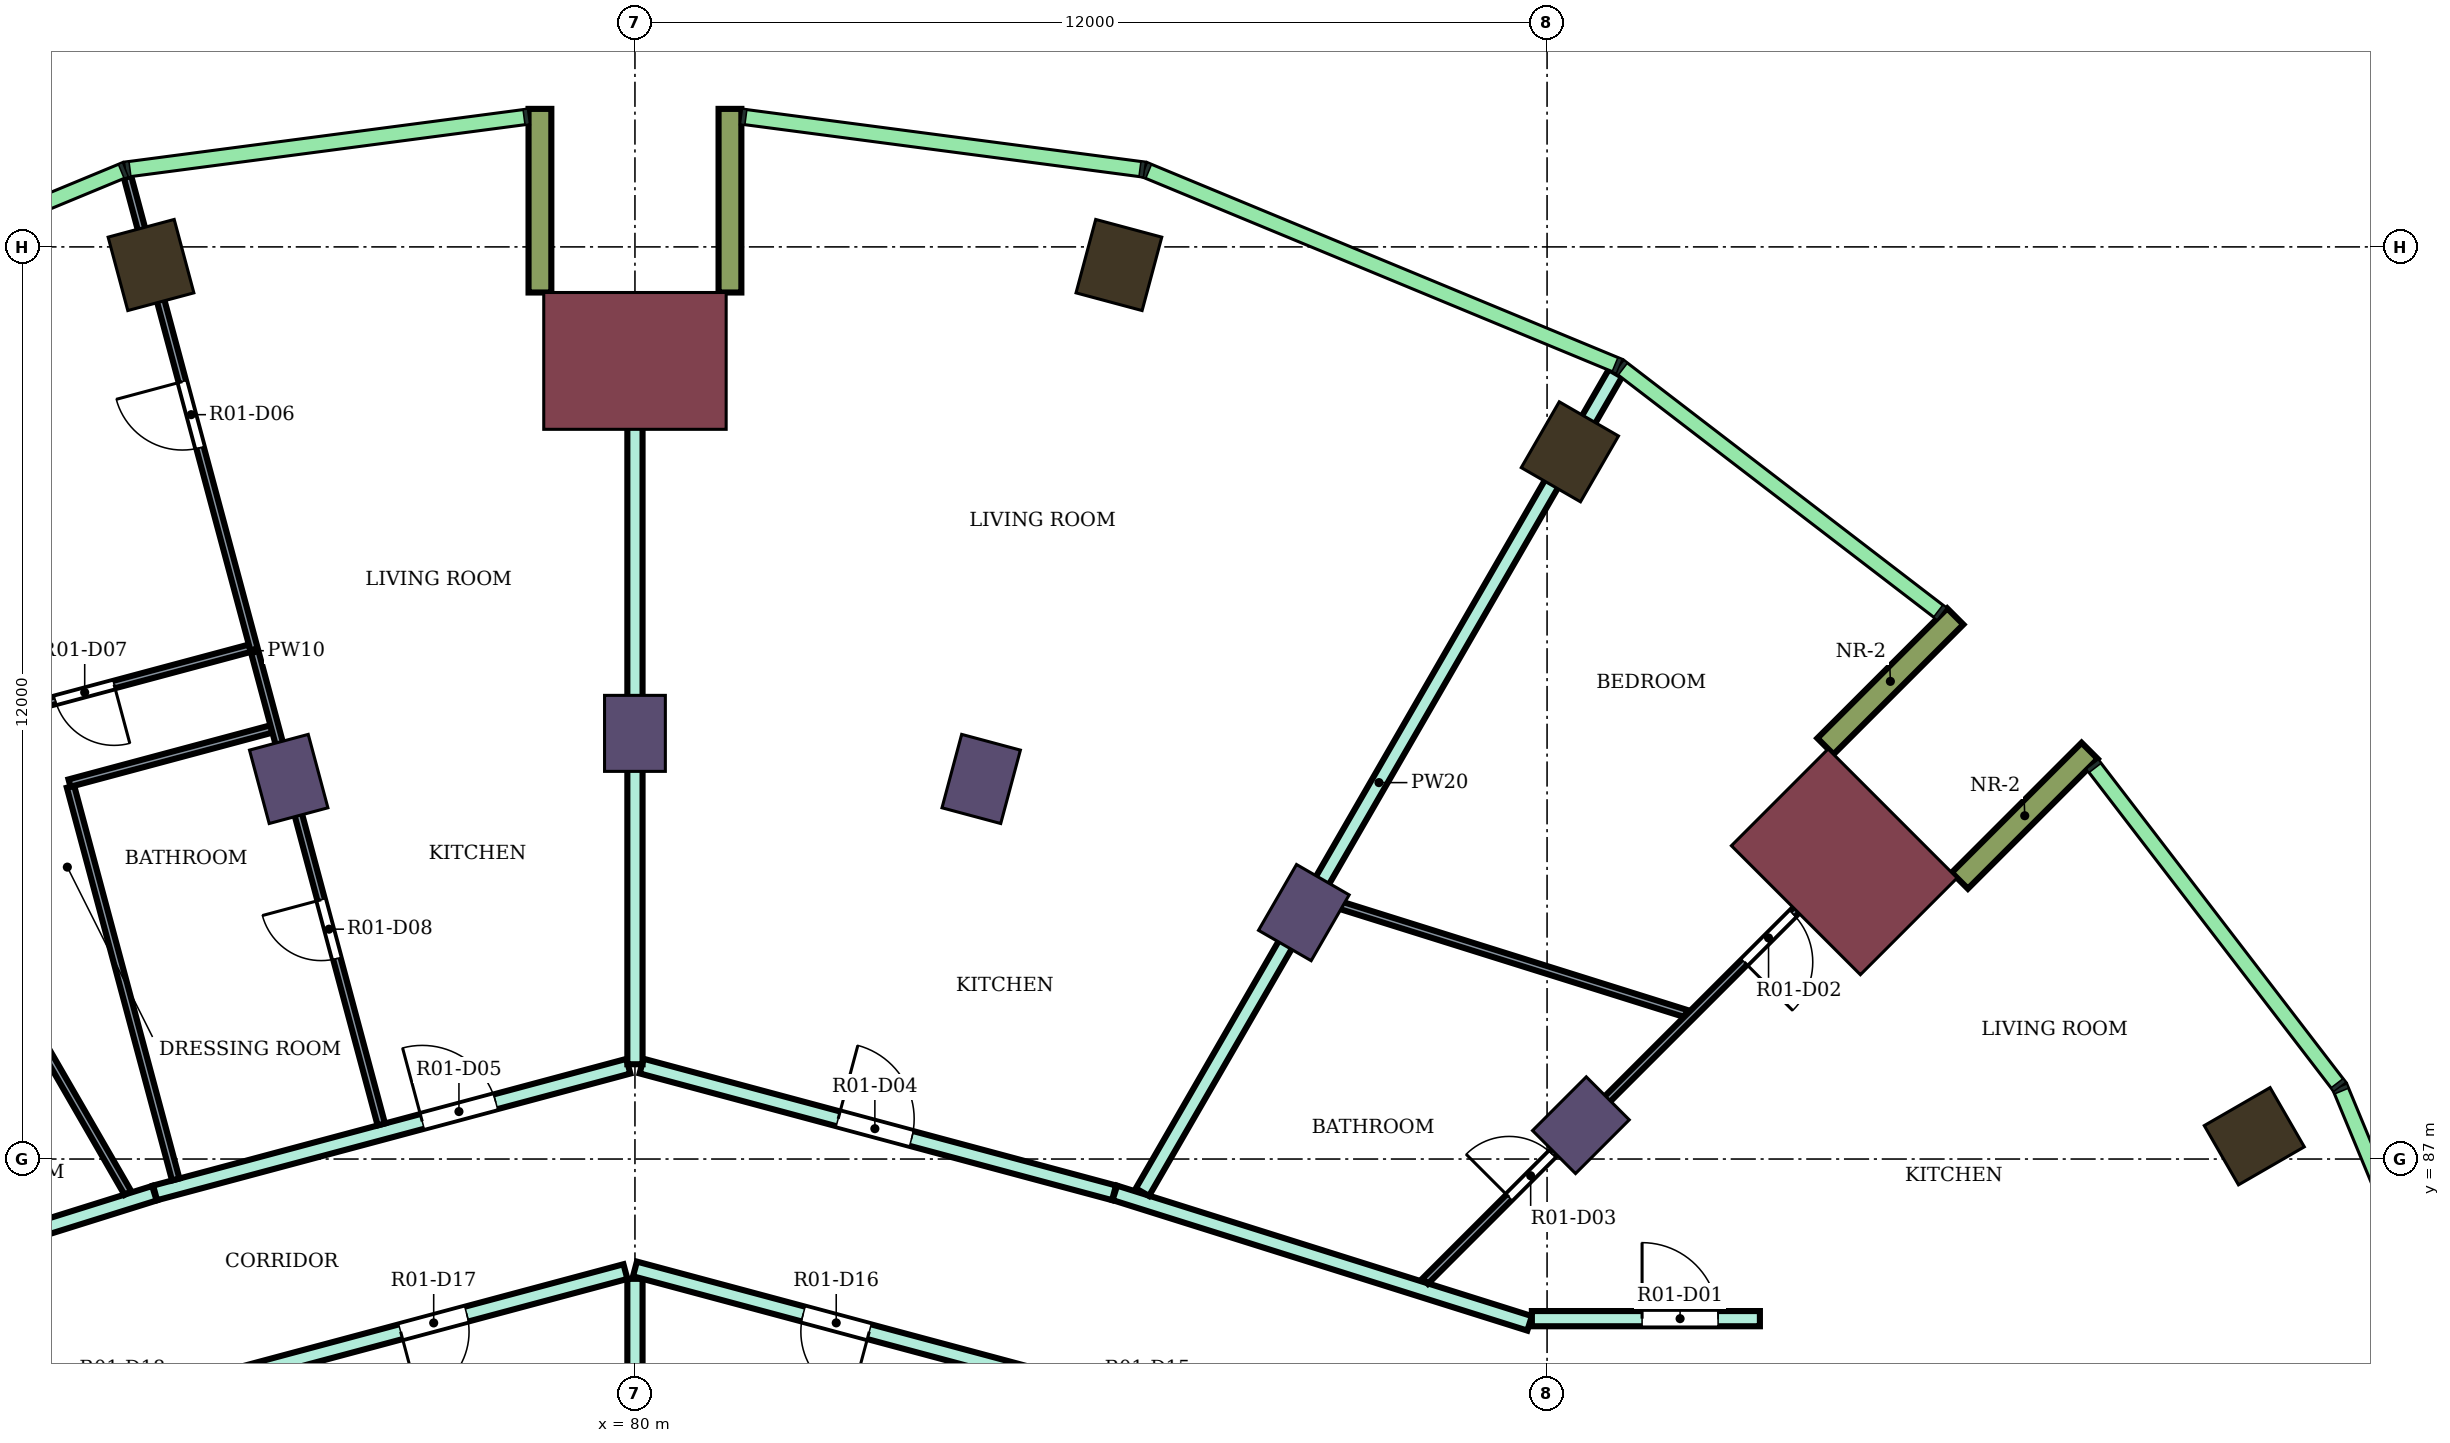
"""IFC4 building model, lengths in metres.
Left out: names, types, materials, properties, quantities, classifications, styles, units other than length and angle.
Written with IfcOpenShell. Run it as: python <this file> out.ifc"""

import sys

from ifc_helpers import new_model, si_unit, direction, frame, frame_2d, origin, origin_2d, place, context, subcontext, project, spatial, rectangle, extrude, element, fill, save


model = new_model("IFC4")
c1 = context("Model", 3, precision=1e-05, world=origin(), true_north=direction((0.0, 1.0)))
c2 = subcontext(c1, "Body", "Model", "MODEL_VIEW")
j1 = project(units=[si_unit("LENGTHUNIT", "METRE"), si_unit("PLANEANGLEUNIT", "RADIAN")], contexts=[c1])
p1 = place(None, origin())
s1 = spatial("IfcSite", under=j1, at=p1, CompositionType="ELEMENT")
p2 = place(p1, origin())
s2 = spatial("IfcBuilding", under=s1, at=p2, CompositionType="ELEMENT")
p3 = place(p2, frame((0.0, 0.0, 165.9)))
s3 = spatial("IfcBuildingStorey", under=s2, at=p3, CompositionType="ELEMENT", Elevation=165.9)
for number, where, z_axis, x_axis in (
    (1, (101.304, 87.3, 0.0), (0.0, 0.0, 1.0), (0.866, 0.5, 0.0)),
    (2, (92.3, 96.304, 0.0), (0.0, 0.0, 1.0), (0.5, 0.866, 0.0)),
    (3, (86.367, 98.762, 0.0), (0.0, 0.0, 1.0), (0.259, 0.966, 0.0)),
    (4, (73.633, 98.762, 0.0), (0.0, 0.0, 1.0), (-0.259, 0.966, 0.0)),
):
    element("IfcColumn", number, at=place(p3, frame(where, z_axis=z_axis, x_axis=x_axis)), inside=s3, PredefinedType="COLUMN", context=c2, shape_type="SweptSolid", body=[
        extrude(rectangle(XDim=1.0, YDim=0.9, at=origin_2d()), origin(), (0.0, 0.0, 1.0), 4.1),
    ])
for number, where, z_axis, x_axis in (
    (5, (92.445, 87.445, 0.0), (0.0, 0.0, 1.0), (0.707, 0.707, 0.0)),
    (6, (88.8, 90.242, 0.0), (0.0, 0.0, 1.0), (0.5, 0.866, 0.0)),
    (7, (84.555, 92.0, 0.0), (0.0, 0.0, 1.0), (0.259, 0.966, 0.0)),
    (8, (80.0, 92.6, 0.0), (0.0, 0.0, 1.0), (0.0, 1.0, 0.0)),
    (9, (75.445, 92.0, 0.0), (0.0, 0.0, 1.0), (-0.259, 0.966, 0.0)),
):
    element("IfcColumn", number, at=place(p3, frame(where, z_axis=z_axis, x_axis=x_axis)), inside=s3, PredefinedType="COLUMN", context=c2, shape_type="SweptSolid", body=[
        extrude(rectangle(XDim=1.0, YDim=0.8, at=origin_2d()), origin(), (0.0, 0.0, 1.0), 4.1),
    ])
for number, where, z_axis, x_axis in (
    (10, (95.91, 90.91, 0.0), (0.0, 0.0, 1.0), (0.707, 0.707, 0.0)),
    (11, (80.0, 97.5, 0.0), (0.0, 0.0, 1.0), (0.0, 1.0, 0.0)),
):
    element("IfcColumn", number, at=place(p3, frame(where, z_axis=z_axis, x_axis=x_axis)), inside=s3, PredefinedType="COLUMN", context=c2, shape_type="SweptSolid", body=[
        extrude(rectangle(XDim=1.8, YDim=2.4, at=origin_2d()), origin(), (0.0, 0.0, 1.0), 4.1),
    ])
for number, where, z_axis, x_axis in (
    (12, (97.43, 90.662, 0.0), (0.0, 0.0, 1.0), (0.707, 0.707, 0.0)),
    (13, (95.662, 92.43, 0.0), (0.0, 0.0, 1.0), (0.707, 0.707, 0.0)),
    (14, (81.25, 98.4, 0.0), (0.0, 0.0, 1.0), (0.0, 1.0, 0.0)),
    (15, (78.75, 98.4, 0.0), (0.0, 0.0, 1.0), (0.0, 1.0, 0.0)),
):
    element("IfcWall", number, at=place(p3, frame(where, z_axis=z_axis, x_axis=x_axis)), inside=s3, PredefinedType="NOTDEFINED", context=c2, shape_type="SweptSolid", body=[
        extrude(rectangle(XDim=2.416, YDim=0.3, at=frame_2d((1.208, 0.0))), origin(), (0.0, 0.0, 1.0), 4.1),
    ])
p4 = place(p3, frame((68.2, 84.834, 0.0), z_axis=(0.0, 0.0, 1.0), x_axis=(0.954272398161, 0.298938438661, 0.0)))
e16 = element("IfcWall", 16, at=p4, inside=s3, PredefinedType="PARTITIONING", context=c2, shape_type="SweptSolid", body=[
    extrude(rectangle(XDim=5.74, YDim=0.2, at=frame_2d((2.87, 0.0))), origin(), (0.0, 0.0, 1.0), 3.65),
])
p5 = place(p3, frame((73.687, 86.554, 0.0), z_axis=(0.0, 0.0, 1.0), x_axis=(0.965999420828, 0.258544230182, 0.0)))
e17 = element("IfcWall", 17, at=p5, inside=s3, PredefinedType="PARTITIONING", context=c2, shape_type="SweptSolid", body=[
    extrude(rectangle(XDim=6.446, YDim=0.2, at=frame_2d((3.223, 0.0))), origin(), (0.0, 0.0, 1.0), 3.65),
])
p6 = place(p5, frame((3.638, 0.0, 0.0)))
e18 = element("IfcOpeningElement", 18, at=p6, cuts=e17, PredefinedType="OPENING", context=c2, shape_type="SweptSolid", body=[
    extrude(rectangle(XDim=1.0, YDim=2.1, at=frame_2d((0.5, 1.05))), frame((0.0, 0.11, 0.0), z_axis=(0.0, -1.0, 0.0), x_axis=(1.0, 0.0, 0.0)), (0.0, 0.0, 1.0), 0.22),
])
p7 = place(p3, frame((74.413, 84.057, 0.0), z_axis=(0.0, 0.0, 1.0), x_axis=(0.965972135939, 0.258646153246, 0.0)))
e19 = element("IfcWall", 19, at=p7, inside=s3, PredefinedType="PARTITIONING", context=c2, shape_type="SweptSolid", body=[
    extrude(rectangle(XDim=5.654, YDim=0.2, at=frame_2d((2.827, 0.0))), origin(), (0.0, 0.0, 1.0), 3.65),
])
p8 = place(p7, frame((2.593, 0.0, 0.0)))
e20 = element("IfcOpeningElement", 20, at=p8, cuts=e19, PredefinedType="OPENING", context=c2, shape_type="SweptSolid", body=[
    extrude(rectangle(XDim=0.9, YDim=2.1, at=frame_2d((0.45, 1.05))), frame((0.0, 0.11, 0.0), z_axis=(0.0, -1.0, 0.0), x_axis=(1.0, 0.0, 0.0)), (0.0, 0.0, 1.0), 0.22),
])
p9 = place(p3, frame((80.0, 82.699, 0.0), z_axis=(0.0, 0.0, 1.0), x_axis=(0.0, 1.0, 0.0)))
e21 = element("IfcWall", 21, at=p9, inside=s3, PredefinedType="PARTITIONING", context=c2, shape_type="SweptSolid", body=[
    extrude(rectangle(XDim=2.725, YDim=0.2, at=frame_2d((1.363, 0.0))), origin(), (0.0, 0.0, 1.0), 3.65),
])
p10 = place(p3, frame((80.0, 85.554, 0.0), z_axis=(0.0, 0.0, 1.0), x_axis=(0.965928989968, -0.258807237802, 0.0)))
e22 = element("IfcWall", 22, at=p10, inside=s3, PredefinedType="PARTITIONING", context=c2, shape_type="SweptSolid", body=[
    extrude(rectangle(XDim=5.774, YDim=0.2, at=frame_2d((2.887, 0.0))), origin(), (0.0, 0.0, 1.0), 3.65),
])
p11 = place(p10, frame((2.292, 0.0, 0.0)))
e23 = element("IfcOpeningElement", 23, at=p11, cuts=e22, PredefinedType="OPENING", context=c2, shape_type="SweptSolid", body=[
    extrude(rectangle(XDim=0.9, YDim=2.1, at=frame_2d((0.45, 1.05))), frame((0.0, 0.11, 0.0), z_axis=(0.0, -1.0, 0.0), x_axis=(1.0, 0.0, 0.0)), (0.0, 0.0, 1.0), 0.22),
])
p12 = place(p3, frame((80.087, 88.223, 0.0), z_axis=(0.0, 0.0, 1.0), x_axis=(0.965852330757, -0.25909317855, 0.0)))
e24 = element("IfcWall", 24, at=p12, inside=s3, PredefinedType="PARTITIONING", context=c2, shape_type="SweptSolid", body=[
    extrude(rectangle(XDim=6.436, YDim=0.2, at=frame_2d((3.218, 0.0))), origin(), (0.0, 0.0, 1.0), 3.65),
])
p13 = place(p12, frame((2.678, 0.0, 0.0)))
e25 = element("IfcOpeningElement", 25, at=p13, cuts=e24, PredefinedType="OPENING", context=c2, shape_type="SweptSolid", body=[
    extrude(rectangle(XDim=1.0, YDim=2.1, at=frame_2d((0.5, 1.05))), frame((0.0, 0.11, 0.0), z_axis=(0.0, -1.0, 0.0), x_axis=(1.0, 0.0, 0.0)), (0.0, 0.0, 1.0), 0.22),
])
p14 = place(p3, frame((80.0, 88.247, 0.0), z_axis=(0.0, 0.0, 1.0), x_axis=(0.0, 1.0, 0.0)))
e26 = element("IfcWall", 26, at=p14, inside=s3, PredefinedType="PARTITIONING", context=c2, shape_type="SweptSolid", body=[
    extrude(rectangle(XDim=9.952, YDim=0.2, at=frame_2d((4.976, 0.0))), origin(), (0.0, 0.0, 1.0), 3.65),
])
p15 = place(p3, frame((86.313, 86.555, 0.0), z_axis=(0.0, 0.0, 1.0), x_axis=(0.953919398959, -0.300062960544, 0.0)))
e27 = element("IfcWall", 27, at=p15, inside=s3, PredefinedType="PARTITIONING", context=c2, shape_type="SweptSolid", body=[
    extrude(rectangle(XDim=5.721, YDim=0.2, at=frame_2d((2.86, 0.0))), origin(), (0.0, 0.0, 1.0), 3.65),
])
p16 = place(p3, frame((86.677, 86.564, 0.0), z_axis=(0.0, 0.0, 1.0), x_axis=(0.500120377296, 0.865955892764, 0.0)))
e28 = element("IfcWall", 28, at=p16, inside=s3, PredefinedType="PARTITIONING", context=c2, shape_type="SweptSolid", body=[
    extrude(rectangle(XDim=12.445, YDim=0.2, at=frame_2d((6.222, 0.0))), origin(), (0.0, 0.0, 1.0), 3.65),
])
p17 = place(p3, frame((91.8, 84.9, 0.0), z_axis=(0.0, 0.0, 1.0), x_axis=(1.0, 0.0, 0.0)))
e29 = element("IfcWall", 29, at=p17, inside=s3, PredefinedType="PARTITIONING", context=c2, shape_type="SweptSolid", body=[
    extrude(rectangle(XDim=3.0, YDim=0.2, at=frame_2d((1.5, 0.0))), origin(), (0.0, 0.0, 1.0), 3.65),
])
p18 = place(p17, frame((1.45, 0.0, 0.0)))
e30 = element("IfcOpeningElement", 30, at=p18, cuts=e29, PredefinedType="OPENING", context=c2, shape_type="SweptSolid", body=[
    extrude(rectangle(XDim=1.0, YDim=2.1, at=frame_2d((0.5, 1.05))), frame((0.0, 0.11, 0.0), z_axis=(0.0, -1.0, 0.0), x_axis=(1.0, 0.0, 0.0)), (0.0, 0.0, 1.0), 0.22),
])
p19 = place(p3, frame((67.101, 97.342, 0.0), z_axis=(0.0, 0.0, 1.0), x_axis=(0.499929451451, -0.866066131177, 0.0)))
e31 = element("IfcWall", 31, at=p19, inside=s3, PredefinedType="PARTITIONING", context=c2, shape_type="SweptSolid", body=[
    extrude(rectangle(XDim=12.456, YDim=0.1, at=frame_2d((6.228, 0.0))), origin(), (0.0, 0.0, 1.0), 3.65),
])
p20 = place(p19, frame((2.434, 0.0, 0.0)))
e32 = element("IfcOpeningElement", 32, at=p20, cuts=e31, PredefinedType="OPENING", context=c2, shape_type="SweptSolid", body=[
    extrude(rectangle(XDim=0.9, YDim=2.1, at=frame_2d((0.45, 1.05))), frame((0.0, 0.06, 0.0), z_axis=(0.0, -1.0, 0.0), x_axis=(1.0, 0.0, 0.0)), (0.0, 0.0, 1.0), 0.12),
])
p21 = place(p3, frame((70.019, 92.405, 0.0), z_axis=(0.0, 0.0, 1.0), x_axis=(0.965982744428, 0.258606530209, 0.0)))
e33 = element("IfcWall", 33, at=p21, inside=s3, PredefinedType="PARTITIONING", context=c2, shape_type="SweptSolid", body=[
    extrude(rectangle(XDim=5.087, YDim=0.1, at=frame_2d((2.543, 0.0))), origin(), (0.0, 0.0, 1.0), 3.65),
])
p22 = place(p21, frame((2.438, 0.0, 0.0)))
e34 = element("IfcOpeningElement", 34, at=p22, cuts=e33, PredefinedType="OPENING", context=c2, shape_type="SweptSolid", body=[
    extrude(rectangle(XDim=0.8, YDim=2.1, at=frame_2d((0.4, 1.05))), frame((0.0, 0.06, 0.0), z_axis=(0.0, -1.0, 0.0), x_axis=(1.0, 0.0, 0.0)), (0.0, 0.0, 1.0), 0.12),
])
p23 = place(p3, frame((72.574, 91.898, 0.0), z_axis=(0.0, 0.0, 1.0), x_axis=(0.258739127054, -0.965947236722, 0.0)))
e35 = element("IfcWall", 35, at=p23, inside=s3, PredefinedType="PARTITIONING", context=c2, shape_type="SweptSolid", body=[
    extrude(rectangle(XDim=5.349, YDim=0.1, at=frame_2d((2.675, 0.0))), origin(), (0.0, 0.0, 1.0), 3.65),
])
p24 = place(p3, frame((72.561, 91.946, 0.0), z_axis=(0.0, 0.0, 1.0), x_axis=(0.96591000446, 0.258878085754, 0.0)))
e36 = element("IfcWall", 36, at=p24, inside=s3, PredefinedType="PARTITIONING", context=c2, shape_type="SweptSolid", body=[
    extrude(rectangle(XDim=2.75, YDim=0.1, at=frame_2d((1.375, 0.0))), origin(), (0.0, 0.0, 1.0), 3.65),
])
p25 = place(p3, frame((73.324, 99.92, 0.0), z_axis=(0.0, 0.0, 1.0), x_axis=(0.258710550884, -0.965954890697, 0.0)))
e37 = element("IfcWall", 37, at=p25, inside=s3, PredefinedType="PARTITIONING", context=c2, shape_type="SweptSolid", body=[
    extrude(rectangle(XDim=12.904, YDim=0.1, at=frame_2d((6.452, 0.0))), origin(), (0.0, 0.0, 1.0), 3.65),
])
p26 = place(p25, frame((2.787, 0.0, 0.0)))
e38 = element("IfcOpeningElement", 38, at=p26, cuts=e37, PredefinedType="OPENING", context=c2, shape_type="SweptSolid", body=[
    extrude(rectangle(XDim=0.9, YDim=2.1, at=frame_2d((0.45, 1.05))), frame((0.0, 0.06, 0.0), z_axis=(0.0, -1.0, 0.0), x_axis=(1.0, 0.0, 0.0)), (0.0, 0.0, 1.0), 0.12),
])
p27 = place(p25, frame((9.844, 0.0, 0.0)))
e39 = element("IfcOpeningElement", 39, at=p27, cuts=e37, PredefinedType="OPENING", context=c2, shape_type="SweptSolid", body=[
    extrude(rectangle(XDim=0.8, YDim=2.1, at=frame_2d((0.4, 1.05))), frame((0.0, 0.06, 0.0), z_axis=(0.0, -1.0, 0.0), x_axis=(1.0, 0.0, 0.0)), (0.0, 0.0, 1.0), 0.12),
])
p28 = place(p3, frame((89.026, 90.419, 0.0), z_axis=(0.0, 0.0, 1.0), x_axis=(0.954207609901, -0.299145177475, 0.0)))
e40 = element("IfcWall", 40, at=p28, inside=s3, PredefinedType="PARTITIONING", context=c2, shape_type="SweptSolid", body=[
    extrude(rectangle(XDim=5.031, YDim=0.1, at=frame_2d((2.516, 0.0))), origin(), (0.0, 0.0, 1.0), 3.65),
])
p29 = place(p3, frame((90.396, 85.393, 0.0), z_axis=(0.0, 0.0, 1.0), x_axis=(0.707236031471, 0.706977507273, 0.0)))
e41 = element("IfcWall", 41, at=p29, inside=s3, PredefinedType="PARTITIONING", context=c2, shape_type="SweptSolid", body=[
    extrude(rectangle(XDim=8.499, YDim=0.1, at=frame_2d((4.25, 0.0))), origin(), (0.0, 0.0, 1.0), 3.65),
])
p30 = place(p29, frame((5.937, 0.0, 0.0)))
e42 = element("IfcOpeningElement", 42, at=p30, cuts=e41, PredefinedType="OPENING", context=c2, shape_type="SweptSolid", body=[
    extrude(rectangle(XDim=0.9, YDim=2.1, at=frame_2d((0.45, 1.05))), frame((0.0, 0.06, 0.0), z_axis=(0.0, -1.0, 0.0), x_axis=(1.0, 0.0, 0.0)), (0.0, 0.0, 1.0), 0.12),
])
p31 = place(p29, frame((1.562, 0.0, 0.0)))
e43 = element("IfcOpeningElement", 43, at=p31, cuts=e41, PredefinedType="OPENING", context=c2, shape_type="SweptSolid", body=[
    extrude(rectangle(XDim=0.8, YDim=2.1, at=frame_2d((0.4, 1.05))), frame((0.0, 0.06, 0.0), z_axis=(0.0, -1.0, 0.0), x_axis=(1.0, 0.0, 0.0)), (0.0, 0.0, 1.0), 0.12),
])
p32 = place(p18, origin())
e44 = element("IfcDoor", 44, at=p32, inside=s3, OperationType="SINGLE_SWING_LEFT", PredefinedType="DOOR", context=c2, shape_type="SweptSolid", body=[
    extrude(rectangle(XDim=1.0, YDim=2.1, at=frame_2d((0.5, 1.05))), frame((0.0, 0.025, 0.0), z_axis=(0.0, -1.0, 0.0), x_axis=(1.0, 0.0, 0.0)), (0.0, 0.0, 1.0), 0.05),
])
fill(e30, e44)
p33 = place(p30, frame((0.9, 0.0, 0.0), z_axis=(0.0, 0.0, 1.0), x_axis=(-1.0, 0.0, 0.0)))
e45 = element("IfcDoor", 45, at=p33, inside=s3, OperationType="SINGLE_SWING_RIGHT", PredefinedType="DOOR", context=c2, shape_type="SweptSolid", body=[
    extrude(rectangle(XDim=0.9, YDim=2.1, at=frame_2d((0.45, 1.05))), frame((0.0, 0.025, 0.0), z_axis=(0.0, -1.0, 0.0), x_axis=(1.0, 0.0, 0.0)), (0.0, 0.0, 1.0), 0.05),
])
fill(e42, e45)
p34 = place(p31, origin())
e46 = element("IfcDoor", 46, at=p34, inside=s3, OperationType="SINGLE_SWING_LEFT", PredefinedType="DOOR", context=c2, shape_type="SweptSolid", body=[
    extrude(rectangle(XDim=0.8, YDim=2.1, at=frame_2d((0.4, 1.05))), frame((0.0, 0.025, 0.0), z_axis=(0.0, -1.0, 0.0), x_axis=(1.0, 0.0, 0.0)), (0.0, 0.0, 1.0), 0.05),
])
fill(e43, e46)
p35 = place(p13, origin())
e47 = element("IfcDoor", 47, at=p35, inside=s3, OperationType="SINGLE_SWING_LEFT", PredefinedType="DOOR", context=c2, shape_type="SweptSolid", body=[
    extrude(rectangle(XDim=1.0, YDim=2.1, at=frame_2d((0.5, 1.05))), frame((0.0, 0.025, 0.0), z_axis=(0.0, -1.0, 0.0), x_axis=(1.0, 0.0, 0.0)), (0.0, 0.0, 1.0), 0.05),
])
fill(e25, e47)
p36 = place(p6, origin())
e48 = element("IfcDoor", 48, at=p36, inside=s3, OperationType="SINGLE_SWING_LEFT", PredefinedType="DOOR", context=c2, shape_type="SweptSolid", body=[
    extrude(rectangle(XDim=1.0, YDim=2.1, at=frame_2d((0.5, 1.05))), frame((0.0, 0.025, 0.0), z_axis=(0.0, -1.0, 0.0), x_axis=(1.0, 0.0, 0.0)), (0.0, 0.0, 1.0), 0.05),
])
fill(e18, e48)
p37 = place(p26, frame((0.9, 0.0, 0.0), z_axis=(0.0, 0.0, 1.0), x_axis=(-1.0, 0.0, 0.0)))
e49 = element("IfcDoor", 49, at=p37, inside=s3, OperationType="SINGLE_SWING_RIGHT", PredefinedType="DOOR", context=c2, shape_type="SweptSolid", body=[
    extrude(rectangle(XDim=0.9, YDim=2.1, at=frame_2d((0.45, 1.05))), frame((0.0, 0.025, 0.0), z_axis=(0.0, -1.0, 0.0), x_axis=(1.0, 0.0, 0.0)), (0.0, 0.0, 1.0), 0.05),
])
fill(e38, e49)
p38 = place(p22, frame((0.8, 0.0, 0.0), z_axis=(0.0, 0.0, 1.0), x_axis=(-1.0, 0.0, 0.0)))
e50 = element("IfcDoor", 50, at=p38, inside=s3, OperationType="SINGLE_SWING_LEFT", PredefinedType="DOOR", context=c2, shape_type="SweptSolid", body=[
    extrude(rectangle(XDim=0.8, YDim=2.1, at=frame_2d((0.4, 1.05))), frame((0.0, 0.025, 0.0), z_axis=(0.0, -1.0, 0.0), x_axis=(1.0, 0.0, 0.0)), (0.0, 0.0, 1.0), 0.05),
])
fill(e34, e50)
p39 = place(p27, frame((0.8, 0.0, 0.0), z_axis=(0.0, 0.0, 1.0), x_axis=(-1.0, 0.0, 0.0)))
e51 = element("IfcDoor", 51, at=p39, inside=s3, OperationType="SINGLE_SWING_RIGHT", PredefinedType="DOOR", context=c2, shape_type="SweptSolid", body=[
    extrude(rectangle(XDim=0.8, YDim=2.1, at=frame_2d((0.4, 1.05))), frame((0.0, 0.025, 0.0), z_axis=(0.0, -1.0, 0.0), x_axis=(1.0, 0.0, 0.0)), (0.0, 0.0, 1.0), 0.05),
])
fill(e39, e51)
p40 = place(p11, frame((0.9, 0.0, 0.0), z_axis=(0.0, 0.0, 1.0), x_axis=(-1.0, 0.0, 0.0)))
e52 = element("IfcDoor", 52, at=p40, inside=s3, OperationType="SINGLE_SWING_LEFT", PredefinedType="DOOR", context=c2, shape_type="SweptSolid", body=[
    extrude(rectangle(XDim=0.9, YDim=2.1, at=frame_2d((0.45, 1.05))), frame((0.0, 0.025, 0.0), z_axis=(0.0, -1.0, 0.0), x_axis=(1.0, 0.0, 0.0)), (0.0, 0.0, 1.0), 0.05),
])
fill(e23, e52)
p41 = place(p8, frame((0.9, 0.0, 0.0), z_axis=(0.0, 0.0, 1.0), x_axis=(-1.0, 0.0, 0.0)))
e53 = element("IfcDoor", 53, at=p41, inside=s3, OperationType="SINGLE_SWING_RIGHT", PredefinedType="DOOR", context=c2, shape_type="SweptSolid", body=[
    extrude(rectangle(XDim=0.9, YDim=2.1, at=frame_2d((0.45, 1.05))), frame((0.0, 0.025, 0.0), z_axis=(0.0, -1.0, 0.0), x_axis=(1.0, 0.0, 0.0)), (0.0, 0.0, 1.0), 0.05),
])
fill(e20, e53)
save(model, sys.argv[1])
